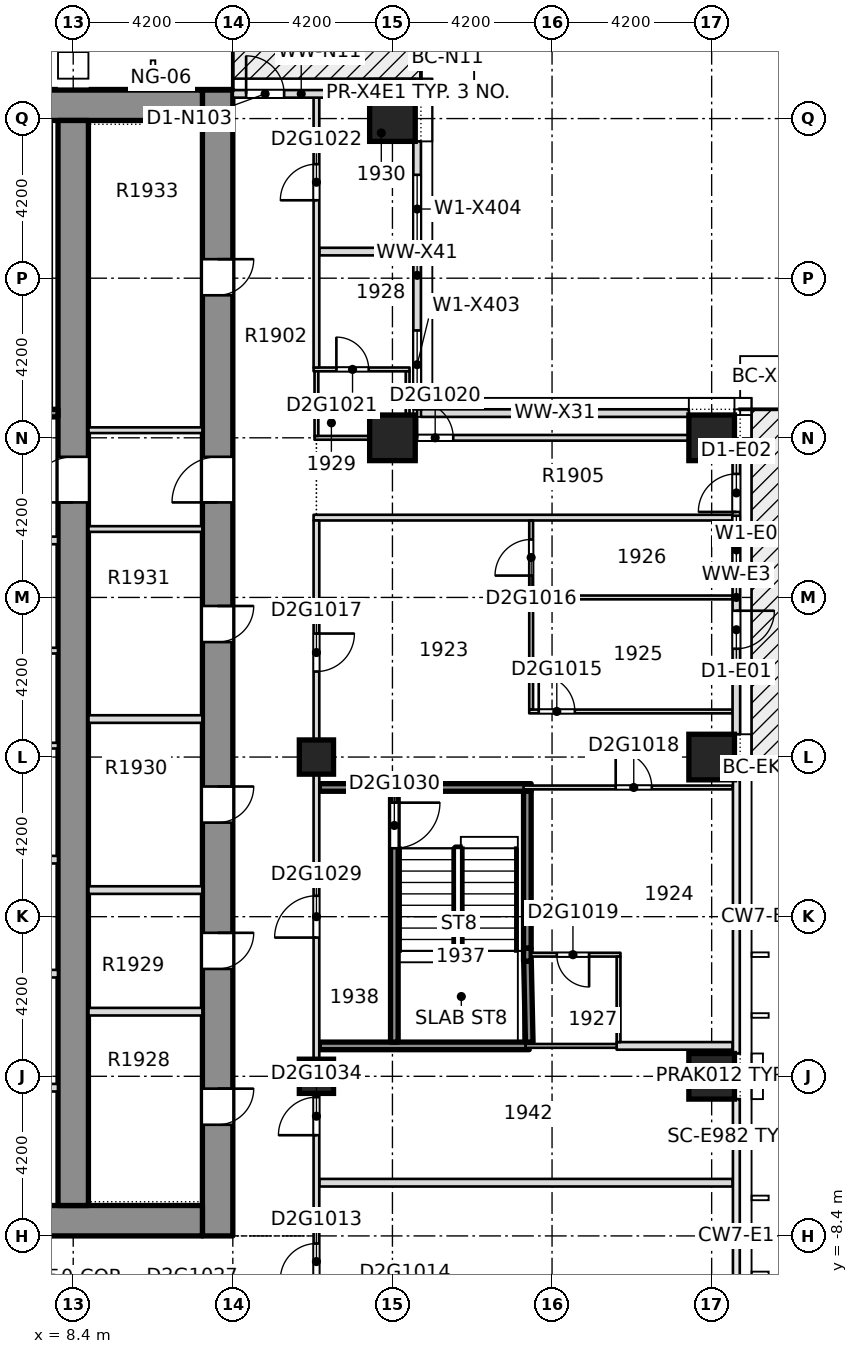
"""IFC4 building model, lengths in metres.
Left out: names, types, materials, properties, quantities, classifications, styles, units other than length and angle.
Written with IfcOpenShell. Run it as: python <this file> out.ifc"""

import sys

from ifc_helpers import new_model, si_unit, direction, frame, frame_2d, origin, origin_2d, place, context, subcontext, project, spatial, rectangle, extrude, element, fill, save


model = new_model("IFC4")
c1 = context("Model", 3, precision=1e-05, world=origin(), true_north=direction((0.0, 1.0)))
c2 = subcontext(c1, "Body", "Model", "MODEL_VIEW")
j1 = project(units=[si_unit("LENGTHUNIT", "METRE"), si_unit("PLANEANGLEUNIT", "RADIAN")], contexts=[c1])
p1 = place(None, origin())
s1 = spatial("IfcSite", under=j1, at=p1, CompositionType="ELEMENT")
p2 = place(p1, origin())
s2 = spatial("IfcBuilding", under=s1, at=p2, CompositionType="ELEMENT")
p3 = place(p2, frame((0.0, 0.0, 75.9)))
s3 = spatial("IfcBuildingStorey", under=s2, at=p3, CompositionType="ELEMENT", Elevation=75.9)
p4 = place(p3, frame((12.15, -8.4, -0.5), z_axis=(0.0, 0.0, 1.0), x_axis=(0.0, 1.0, 0.0)))
e1 = element("IfcWall", 1, at=p4, inside=s3, PredefinedType="SHEAR", context=c2, shape_type="SweptSolid", body=[
    extrude(rectangle(XDim=30.15, YDim=0.9, at=frame_2d((15.075, 0.0))), origin(), (0.0, 0.0, 1.0), 4.68),
])
p5 = place(p4, frame((2.875, 0.0, 0.5)))
e2 = element("IfcOpeningElement", 2, at=p5, cuts=e1, PredefinedType="OPENING", context=c2, shape_type="SweptSolid", body=[
    extrude(rectangle(XDim=0.95, YDim=2.1, at=frame_2d((0.475, 1.05))), frame((0.0, 0.46, 0.0), z_axis=(0.0, -1.0, 0.0), x_axis=(1.0, 0.0, 0.0)), (0.0, 0.0, 1.0), 0.92),
])
p6 = place(p4, frame((6.575, 0.0, 0.5)))
e3 = element("IfcOpeningElement", 3, at=p6, cuts=e1, PredefinedType="OPENING", context=c2, shape_type="SweptSolid", body=[
    extrude(rectangle(XDim=0.95, YDim=2.1, at=frame_2d((0.475, 1.05))), frame((0.0, 0.46, 0.0), z_axis=(0.0, -1.0, 0.0), x_axis=(1.0, 0.0, 0.0)), (0.0, 0.0, 1.0), 0.92),
])
p7 = place(p4, frame((9.425, 0.0, 0.5)))
e4 = element("IfcOpeningElement", 4, at=p7, cuts=e1, PredefinedType="OPENING", context=c2, shape_type="SweptSolid", body=[
    extrude(rectangle(XDim=0.95, YDim=2.1, at=frame_2d((0.475, 1.05))), frame((0.0, 0.46, 0.0), z_axis=(0.0, -1.0, 0.0), x_axis=(1.0, 0.0, 0.0)), (0.0, 0.0, 1.0), 0.92),
])
p8 = place(p4, frame((13.225, 0.0, 0.5)))
e5 = element("IfcOpeningElement", 5, at=p8, cuts=e1, PredefinedType="OPENING", context=c2, shape_type="SweptSolid", body=[
    extrude(rectangle(XDim=0.95, YDim=2.1, at=frame_2d((0.475, 1.05))), frame((0.0, 0.46, 0.0), z_axis=(0.0, -1.0, 0.0), x_axis=(1.0, 0.0, 0.0)), (0.0, 0.0, 1.0), 0.92),
])
p9 = place(p4, frame((16.775, 0.0, 0.5)))
e6 = element("IfcOpeningElement", 6, at=p9, cuts=e1, PredefinedType="OPENING", context=c2, shape_type="SweptSolid", body=[
    extrude(rectangle(XDim=0.95, YDim=2.1, at=frame_2d((0.475, 1.05))), frame((0.0, 0.46, 0.0), z_axis=(0.0, -1.0, 0.0), x_axis=(1.0, 0.0, 0.0)), (0.0, 0.0, 1.0), 0.92),
])
p10 = place(p4, frame((24.75, 0.0, 0.5)))
e7 = element("IfcOpeningElement", 7, at=p10, cuts=e1, PredefinedType="OPENING", context=c2, shape_type="SweptSolid", body=[
    extrude(rectangle(XDim=0.95, YDim=2.1, at=frame_2d((0.475, 1.05))), frame((0.0, 0.46, 0.0), z_axis=(0.0, -1.0, 0.0), x_axis=(1.0, 0.0, 0.0)), (0.0, 0.0, 1.0), 0.92),
])
p11 = place(p4, frame((19.3, 0.0, 0.5)))
e8 = element("IfcOpeningElement", 8, at=p11, cuts=e1, PredefinedType="OPENING", context=c2, shape_type="SweptSolid", body=[
    extrude(rectangle(XDim=1.2, YDim=2.1, at=frame_2d((0.6, 1.05))), frame((0.0, 0.46, 0.0), z_axis=(0.0, -1.0, 0.0), x_axis=(1.0, 0.0, 0.0)), (0.0, 0.0, 1.0), 0.92),
])
p12 = place(p3, frame((-11.7, -7.95, -0.5), z_axis=(0.0, 0.0, 1.0), x_axis=(1.0, 0.0, 0.0)))
e9 = element("IfcWall", 9, at=p12, inside=s3, PredefinedType="SHEAR", context=c2, shape_type="SweptSolid", body=[
    extrude(rectangle(XDim=23.4, YDim=0.9, at=frame_2d((11.7, 0.0))), origin(), (0.0, 0.0, 1.0), 4.68),
])
p13 = place(p12, frame((6.95, 0.0, 0.5)))
e10 = element("IfcOpeningElement", 10, at=p13, cuts=e9, PredefinedType="OPENING", context=c2, shape_type="SweptSolid", body=[
    extrude(rectangle(XDim=1.8, YDim=2.1, at=frame_2d((0.9, 1.05))), frame((0.0, 0.46, 0.0), z_axis=(0.0, -1.0, 0.0), x_axis=(1.0, 0.0, 0.0)), (0.0, 0.0, 1.0), 0.92),
])
p14 = place(p12, frame((14.65, 0.0, 0.5)))
e11 = element("IfcOpeningElement", 11, at=p14, cuts=e9, PredefinedType="OPENING", context=c2, shape_type="SweptSolid", body=[
    extrude(rectangle(XDim=1.8, YDim=2.1, at=frame_2d((0.9, 1.05))), frame((0.0, 0.46, 0.0), z_axis=(0.0, -1.0, 0.0), x_axis=(1.0, 0.0, 0.0)), (0.0, 0.0, 1.0), 0.92),
])
p15 = place(p3, frame((-11.7, 21.3, -0.5), z_axis=(0.0, 0.0, 1.0), x_axis=(1.0, 0.0, 0.0)))
e12 = element("IfcWall", 12, at=p15, inside=s3, PredefinedType="SOLIDWALL", context=c2, shape_type="SweptSolid", body=[
    extrude(rectangle(XDim=23.4, YDim=0.9, at=frame_2d((11.7, 0.0))), origin(), (0.0, 0.0, 1.0), 4.68),
])
p16 = place(p3, frame((8.4, -7.5, -0.5), z_axis=(0.0, 0.0, 1.0), x_axis=(0.0, 1.0, 0.0)))
e13 = element("IfcWall", 13, at=p16, inside=s3, PredefinedType="SHEAR", context=c2, shape_type="SweptSolid", body=[
    extrude(rectangle(XDim=28.35, YDim=0.9, at=frame_2d((14.175, 0.0))), origin(), (0.0, 0.0, 1.0), 4.68),
])
p17 = place(p16, frame((18.4, 0.0, 0.5)))
e14 = element("IfcOpeningElement", 14, at=p17, cuts=e13, PredefinedType="OPENING", context=c2, shape_type="SweptSolid", body=[
    extrude(rectangle(XDim=1.2, YDim=2.1, at=frame_2d((0.6, 1.05))), frame((0.0, 0.46, 0.0), z_axis=(0.0, -1.0, 0.0), x_axis=(1.0, 0.0, 0.0)), (0.0, 0.0, 1.0), 0.92),
])
p18 = place(p3, frame((16.8, 21.0, -0.5), z_axis=(0.0, 0.0, 1.0), x_axis=(1.0, 0.0, 0.0)))
e15 = element("IfcColumn", 15, at=p18, inside=s3, PredefinedType="COLUMN", context=c2, shape_type="SweptSolid", body=[
    extrude(rectangle(XDim=1.4, YDim=1.4, at=origin_2d()), origin(), (0.0, 0.0, 1.0), 4.68),
])
for number, where, z_axis, x_axis in (
    (16, (14.9, -4.2, 0.0), (0.0, 0.0, 1.0), (1.0, 0.0, 0.0)),
    (17, (14.9, 4.2, 0.0), (0.0, 0.0, 1.0), (1.0, 0.0, 0.0)),
    (18, (14.9, 12.6, 0.0), (0.0, 0.0, 1.0), (1.0, 0.0, 0.0)),
):
    element("IfcWall", number, at=place(p3, frame(where, z_axis=z_axis, x_axis=x_axis)), inside=s3, PredefinedType="SHEAR", context=c2, shape_type="SweptSolid", body=[
        extrude(rectangle(XDim=10.3, YDim=0.6, at=frame_2d((5.15, 0.0))), origin(), (0.0, 0.0, 1.0), 4.18),
    ])
p19 = place(p3, frame((14.725, -8.4, 0.0), z_axis=(0.0, 0.0, 1.0), x_axis=(1.0, 0.0, 0.0)))
e19 = element("IfcWall", 19, at=p19, inside=s3, PredefinedType="PARTITIONING", context=c2, shape_type="SweptSolid", body=[
    extrude(rectangle(XDim=7.4, YDim=0.15, at=frame_2d((3.7, 0.0))), origin(), (0.0, 0.0, 1.0), 4.18),
])
p20 = place(p19, frame((0.775, 0.0, 0.0)))
e20 = element("IfcOpeningElement", 20, at=p20, cuts=e19, PredefinedType="OPENING", context=c2, shape_type="SweptSolid", body=[
    extrude(rectangle(XDim=1.2, YDim=2.1, at=frame_2d((0.6, 1.05))), frame((0.0, 0.085, 0.0), z_axis=(0.0, -1.0, 0.0), x_axis=(1.0, 0.0, 0.0)), (0.0, 0.0, 1.0), 0.17),
])
for number, where, z_axis, x_axis in (
    (21, (25.201, -4.35, 0.0), (0.0, 0.0, 1.0), (1.0, 0.0, 0.0)),
    (22, (25.201, 4.091, 0.0), (0.0, 0.0, 1.0), (1.0, 0.0, 0.0)),
):
    element("IfcWall", number, at=place(p3, frame(where, z_axis=z_axis, x_axis=x_axis)), inside=s3, PredefinedType="PARTITIONING", context=c2, shape_type="SweptSolid", body=[
        extrude(rectangle(XDim=0.549, YDim=0.2, at=frame_2d((0.274, 0.0))), origin(), (0.0, 0.0, 1.0), 4.18),
    ])
p21 = place(p3, frame((14.875, 10.95, 0.0), z_axis=(0.0, 0.0, 1.0), x_axis=(1.0, 0.0, 0.0)))
e23 = element("IfcWall", 23, at=p21, inside=s3, PredefinedType="PARTITIONING", context=c2, shape_type="SweptSolid", body=[
    extrude(rectangle(XDim=10.875, YDim=0.2, at=frame_2d((5.438, 0.0))), origin(), (0.0, 0.0, 1.0), 4.18),
])
p22 = place(p3, frame((14.875, 13.35, 0.0), z_axis=(0.0, 0.0, 1.0), x_axis=(1.0, 0.0, 0.0)))
e24 = element("IfcWall", 24, at=p22, inside=s3, PredefinedType="PARTITIONING", context=c2, shape_type="SweptSolid", body=[
    extrude(rectangle(XDim=2.475, YDim=0.2, at=frame_2d((1.238, 0.0))), origin(), (0.0, 0.0, 1.0), 4.18),
])
p23 = place(p3, frame((14.8, -8.325, 0.0), z_axis=(0.0, 0.0, 1.0), x_axis=(0.0, 1.0, 0.0)))
e25 = element("IfcWall", 25, at=p23, inside=s3, PredefinedType="PARTITIONING", context=c2, shape_type="SweptSolid", body=[
    extrude(rectangle(XDim=29.875, YDim=0.15, at=frame_2d((14.938, 0.0))), origin(), (0.0, 0.0, 1.0), 4.18),
])
p24 = place(p23, frame((7.595, 0.0, 0.0)))
e26 = element("IfcOpeningElement", 26, at=p24, cuts=e25, PredefinedType="OPENING", context=c2, shape_type="SweptSolid", body=[
    extrude(rectangle(XDim=1.2, YDim=2.1, at=frame_2d((0.6, 1.05))), frame((0.0, 0.085, 0.0), z_axis=(0.0, -1.0, 0.0), x_axis=(1.0, 0.0, 0.0)), (0.0, 0.0, 1.0), 0.17),
])
p25 = place(p23, frame((15.245, 0.0, 0.0)))
e27 = element("IfcOpeningElement", 27, at=p25, cuts=e25, PredefinedType="OPENING", context=c2, shape_type="SweptSolid", body=[
    extrude(rectangle(XDim=1.2, YDim=2.1, at=frame_2d((0.6, 1.05))), frame((0.0, 0.085, 0.0), z_axis=(0.0, -1.0, 0.0), x_axis=(1.0, 0.0, 0.0)), (0.0, 0.0, 1.0), 0.17),
])
p26 = place(p23, frame((19.375, 0.0, 0.0)))
e28 = element("IfcOpeningElement", 28, at=p26, cuts=e25, PredefinedType="OPENING", context=c2, shape_type="SweptSolid", body=[
    extrude(rectangle(XDim=1.2, YDim=2.1, at=frame_2d((0.6, 1.05))), frame((0.0, 0.085, 0.0), z_axis=(0.0, -1.0, 0.0), x_axis=(1.0, 0.0, 0.0)), (0.0, 0.0, 1.0), 0.17),
])
p27 = place(p23, frame((25.325, 0.0, 0.0)))
e29 = element("IfcOpeningElement", 29, at=p27, cuts=e25, PredefinedType="OPENING", context=c2, shape_type="SweptSolid", body=[
    extrude(rectangle(XDim=0.9, YDim=2.1, at=frame_2d((0.45, 1.05))), frame((0.0, 0.085, 0.0), z_axis=(0.0, -1.0, 0.0), x_axis=(1.0, 0.0, 0.0)), (0.0, 0.0, 1.0), 0.17),
])
p28 = place(p3, frame((22.05, -12.299, 0.0), z_axis=(0.0, 0.0, 1.0), x_axis=(0.0, 1.0, 0.0)))
e30 = element("IfcWall", 30, at=p28, inside=s3, PredefinedType="PARTITIONING", context=c2, shape_type="SweptSolid", body=[
    extrude(rectangle(XDim=3.824, YDim=0.15, at=frame_2d((1.912, 0.0))), origin(), (0.0, 0.0, 1.0), 4.18),
])
for number, where, z_axis, x_axis in (
    (31, (25.85, -11.9, 0.0), (0.0, 0.0, 1.0), (0.0, 1.0, 0.0)),
    (32, (25.85, -3.5, 0.0), (0.0, 0.0, 1.0), (0.0, 1.0, 0.0)),
    (33, (25.85, 4.9, 0.0), (0.0, 0.0, 1.0), (0.0, 1.0, 0.0)),
):
    element("IfcWall", number, at=place(p3, frame(where, z_axis=z_axis, x_axis=x_axis)), inside=s3, PredefinedType="STANDARD", context=c2, shape_type="SweptSolid", body=[
        extrude(rectangle(XDim=7.0, YDim=0.2, at=frame_2d((3.5, 0.0))), origin(), (0.0, 0.0, 1.0), 4.18),
    ])
for number, where, z_axis, x_axis in (
    (34, (24.5, 13.25, 0.0), (0.0, 0.0, 1.0), (-1.0, 0.0, 0.0)),
    (35, (17.45, 13.35, 0.0), (0.0, 0.0, 1.0), (0.0, 1.0, 0.0)),
):
    element("IfcWall", number, at=place(p3, frame(where, z_axis=z_axis, x_axis=x_axis)), inside=s3, PredefinedType="STANDARD", context=c2, shape_type="SweptSolid", body=[
        extrude(rectangle(XDim=6.95, YDim=0.2, at=frame_2d((3.475, 0.0))), origin(), (0.0, 0.0, 1.0), 4.18),
    ])
p29 = place(p3, frame((16.1, 21.65, 0.0), z_axis=(0.0, 0.0, 1.0), x_axis=(-1.0, 0.0, 0.0)))
e36 = element("IfcWall", 36, at=p29, inside=s3, PredefinedType="STANDARD", context=c2, shape_type="SweptSolid", body=[
    extrude(rectangle(XDim=3.5, YDim=0.2, at=frame_2d((1.75, 0.0))), origin(), (0.0, 0.0, 1.0), 4.18),
])
for number, where, z_axis, x_axis in (
    (37, (5.575, -4.5, 0.0), (0.0, 0.0, 1.0), (1.0, 0.0, 0.0)),
    (38, (5.575, -1.5, 0.0), (0.0, 0.0, 1.0), (1.0, 0.0, 0.0)),
):
    element("IfcWall", number, at=place(p3, frame(where, z_axis=z_axis, x_axis=x_axis)), inside=s3, PredefinedType="PARTITIONING", context=c2, shape_type="SweptSolid", body=[
        extrude(rectangle(XDim=2.374, YDim=0.2, at=frame_2d((1.187, 0.0))), origin(), (0.0, 0.0, 1.0), 4.18),
    ])
p30 = place(p3, frame((5.425, 4.5, 0.0), z_axis=(0.0, 0.0, 1.0), x_axis=(1.0, 0.0, 0.0)))
e39 = element("IfcWall", 39, at=p30, inside=s3, PredefinedType="PARTITIONING", context=c2, shape_type="SweptSolid", body=[
    extrude(rectangle(XDim=2.524, YDim=0.15, at=frame_2d((1.262, 0.0))), origin(), (0.0, 0.0, 1.0), 4.18),
])
p31 = place(p3, frame((-7.949, 7.0, 0.0), z_axis=(0.0, 0.0, 1.0), x_axis=(1.0, 0.0, 0.0)))
e40 = element("IfcWall", 40, at=p31, inside=s3, PredefinedType="PARTITIONING", context=c2, shape_type="SweptSolid", body=[
    extrude(rectangle(XDim=15.898, YDim=0.15, at=frame_2d((7.949, 0.0))), origin(), (0.0, 0.0, 1.0), 4.18),
])
p32 = place(p31, frame((7.249, 0.0, 0.0)))
e41 = element("IfcOpeningElement", 41, at=p32, cuts=e40, PredefinedType="OPENING", context=c2, shape_type="SweptSolid", body=[
    extrude(rectangle(XDim=1.4, YDim=2.1, at=frame_2d((0.7, 1.05))), frame((0.0, 0.085, 0.0), z_axis=(0.0, -1.0, 0.0), x_axis=(1.0, 0.0, 0.0)), (0.0, 0.0, 1.0), 0.17),
])
p33 = place(p3, frame((3.6, 9.9, 0.0), z_axis=(0.0, 0.0, 1.0), x_axis=(1.0, 0.0, 0.0)))
e42 = element("IfcWall", 42, at=p33, inside=s3, PredefinedType="PARTITIONING", context=c2, shape_type="SweptSolid", body=[
    extrude(rectangle(XDim=4.349, YDim=0.2, at=frame_2d((2.174, 0.0))), origin(), (0.0, 0.0, 1.0), 4.18),
])
p34 = place(p33, frame((2.25, 0.0, 0.0)))
e43 = element("IfcOpeningElement", 43, at=p34, cuts=e42, PredefinedType="OPENING", context=c2, shape_type="SweptSolid", body=[
    extrude(rectangle(XDim=1.1, YDim=2.1, at=frame_2d((0.55, 1.05))), frame((0.0, 0.11, 0.0), z_axis=(0.0, -1.0, 0.0), x_axis=(1.0, 0.0, 0.0)), (0.0, 0.0, 1.0), 0.22),
])
p35 = place(p3, frame((3.425, 13.25, 0.0), z_axis=(0.0, 0.0, 1.0), x_axis=(1.0, 0.0, 0.0)))
e44 = element("IfcWall", 44, at=p35, inside=s3, PredefinedType="SOLIDWALL", context=c2, shape_type="SweptSolid", body=[
    extrude(rectangle(XDim=4.524, YDim=0.2, at=frame_2d((2.262, 0.0))), origin(), (0.0, 0.0, 1.0), 4.18),
])
p36 = place(p35, frame((1.825, 0.0, 0.0)))
e45 = element("IfcOpeningElement", 45, at=p36, cuts=e44, PredefinedType="OPENING", context=c2, shape_type="SweptSolid", body=[
    extrude(rectangle(XDim=1.2, YDim=2.1, at=frame_2d((0.6, 1.05))), frame((0.0, 0.11, 0.0), z_axis=(0.0, -1.0, 0.0), x_axis=(1.0, 0.0, 0.0)), (0.0, 0.0, 1.0), 0.22),
])
for number, where, z_axis, x_axis in (
    (46, (8.851, -2.6, 0.0), (0.0, 0.0, 1.0), (1.0, 0.0, 0.0)),
    (47, (8.851, -0.1, 0.0), (0.0, 0.0, 1.0), (1.0, 0.0, 0.0)),
    (48, (8.851, 3.1, 0.0), (0.0, 0.0, 1.0), (1.0, 0.0, 0.0)),
):
    element("IfcWall", number, at=place(p3, frame(where, z_axis=z_axis, x_axis=x_axis)), inside=s3, PredefinedType="PARTITIONING", context=c2, shape_type="SweptSolid", body=[
        extrude(rectangle(XDim=2.848, YDim=0.2, at=frame_2d((1.424, 0.0))), origin(), (0.0, 0.0, 1.0), 4.18),
    ])
for number, where, z_axis, x_axis in (
    (49, (8.851, 7.5, 0.0), (0.0, 0.0, 1.0), (1.0, 0.0, 0.0)),
    (50, (8.851, 10.2, 0.0), (0.0, 0.0, 1.0), (1.0, 0.0, 0.0)),
):
    element("IfcWall", number, at=place(p3, frame(where, z_axis=z_axis, x_axis=x_axis)), inside=s3, PredefinedType="PARTITIONING", context=c2, shape_type="SweptSolid", body=[
        extrude(rectangle(XDim=2.848, YDim=0.1, at=frame_2d((1.424, 0.0))), origin(), (0.0, 0.0, 1.0), 4.18),
    ])
p37 = place(p3, frame((8.851, 12.8, 0.0), z_axis=(0.0, 0.0, 1.0), x_axis=(1.0, 0.0, 0.0)))
e51 = element("IfcWall", 51, at=p37, inside=s3, PredefinedType="PARTITIONING", context=c2, shape_type="SweptSolid", body=[
    extrude(rectangle(XDim=2.848, YDim=0.15, at=frame_2d((1.424, 0.0))), origin(), (0.0, 0.0, 1.0), 4.18),
])
for number, where, z_axis, x_axis in (
    (52, (16.75, -3.4, 0.0), (0.0, 0.0, 1.0), (1.0, 0.0, 0.0)),
    (53, (16.75, 3.4, 0.0), (0.0, 0.0, 1.0), (1.0, 0.0, 0.0)),
):
    element("IfcWall", number, at=place(p3, frame(where, z_axis=z_axis, x_axis=x_axis)), inside=s3, PredefinedType="SOLIDWALL", context=c2, shape_type="SweptSolid", body=[
        extrude(rectangle(XDim=3.7, YDim=0.2, at=frame_2d((1.85, 0.0))), origin(), (0.0, 0.0, 1.0), 4.18),
    ])
for number, where, z_axis, x_axis in (
    (54, (16.85, -3.3, 0.0), (0.0, 0.0, 1.0), (0.0, 1.0, 0.0)),
    (55, (20.35, -3.3, 0.0), (0.0, 0.0, 1.0), (0.0, 1.0, 0.0)),
):
    element("IfcWall", number, at=place(p3, frame(where, z_axis=z_axis, x_axis=x_axis)), inside=s3, PredefinedType="SOLIDWALL", context=c2, shape_type="SweptSolid", body=[
        extrude(rectangle(XDim=6.6, YDim=0.2, at=frame_2d((3.3, 0.0))), origin(), (0.0, 0.0, 1.0), 4.18),
    ])
p38 = place(p20, origin())
e56 = element("IfcDoor", 56, at=p38, inside=s3, OperationType="SINGLE_SWING_RIGHT", PredefinedType="DOOR", context=c2, shape_type="SweptSolid", body=[
    extrude(rectangle(XDim=1.2, YDim=2.1, at=frame_2d((0.6, 1.05))), frame((0.0, 0.025, 0.0), z_axis=(0.0, -1.0, 0.0), x_axis=(1.0, 0.0, 0.0)), (0.0, 0.0, 1.0), 0.05),
])
fill(e20, e56)
p39 = place(p24, origin())
e57 = element("IfcDoor", 57, at=p39, inside=s3, OperationType="SINGLE_SWING_LEFT", PredefinedType="DOOR", context=c2, shape_type="SweptSolid", body=[
    extrude(rectangle(XDim=1.2, YDim=2.1, at=frame_2d((0.6, 1.05))), frame((0.0, 0.025, 0.0), z_axis=(0.0, -1.0, 0.0), x_axis=(1.0, 0.0, 0.0)), (0.0, 0.0, 1.0), 0.05),
])
fill(e26, e57)
p40 = place(p25, origin())
e58 = element("IfcDoor", 58, at=p40, inside=s3, OperationType="SINGLE_SWING_LEFT", PredefinedType="DOOR", context=c2, shape_type="SweptSolid", body=[
    extrude(rectangle(XDim=1.2, YDim=2.1, at=frame_2d((0.6, 1.05))), frame((0.0, 0.025, 0.0), z_axis=(0.0, -1.0, 0.0), x_axis=(1.0, 0.0, 0.0)), (0.0, 0.0, 1.0), 0.05),
])
fill(e27, e58)
p41 = place(p26, origin())
e59 = element("IfcDoor", 59, at=p41, inside=s3, OperationType="SINGLE_SWING_RIGHT", PredefinedType="DOOR", context=c2, shape_type="SweptSolid", body=[
    extrude(rectangle(XDim=1.2, YDim=2.1, at=frame_2d((0.6, 1.05))), frame((0.0, 0.025, 0.0), z_axis=(0.0, -1.0, 0.0), x_axis=(1.0, 0.0, 0.0)), (0.0, 0.0, 1.0), 0.05),
])
fill(e28, e59)
p42 = place(p27, origin())
e60 = element("IfcDoor", 60, at=p42, inside=s3, OperationType="SINGLE_SWING_RIGHT", PredefinedType="DOOR", context=c2, shape_type="SweptSolid", body=[
    extrude(rectangle(XDim=0.9, YDim=2.1, at=frame_2d((0.45, 1.05))), frame((0.0, 0.025, 0.0), z_axis=(0.0, -1.0, 0.0), x_axis=(1.0, 0.0, 0.0)), (0.0, 0.0, 1.0), 0.05),
])
fill(e29, e60)
p43 = place(p5, origin())
e61 = element("IfcDoor", 61, at=p43, inside=s3, OperationType="SINGLE_SWING_LEFT", PredefinedType="DOOR", context=c2, shape_type="SweptSolid", body=[
    extrude(rectangle(XDim=0.95, YDim=2.1, at=frame_2d((0.475, 1.05))), frame((0.0, 0.025, 0.0), z_axis=(0.0, -1.0, 0.0), x_axis=(1.0, 0.0, 0.0)), (0.0, 0.0, 1.0), 0.05),
])
fill(e2, e61)
p44 = place(p6, origin())
e62 = element("IfcDoor", 62, at=p44, inside=s3, OperationType="SINGLE_SWING_LEFT", PredefinedType="DOOR", context=c2, shape_type="SweptSolid", body=[
    extrude(rectangle(XDim=0.95, YDim=2.1, at=frame_2d((0.475, 1.05))), frame((0.0, 0.025, 0.0), z_axis=(0.0, -1.0, 0.0), x_axis=(1.0, 0.0, 0.0)), (0.0, 0.0, 1.0), 0.05),
])
fill(e3, e62)
p45 = place(p7, origin())
e63 = element("IfcDoor", 63, at=p45, inside=s3, OperationType="SINGLE_SWING_LEFT", PredefinedType="DOOR", context=c2, shape_type="SweptSolid", body=[
    extrude(rectangle(XDim=0.95, YDim=2.1, at=frame_2d((0.475, 1.05))), frame((0.0, 0.025, 0.0), z_axis=(0.0, -1.0, 0.0), x_axis=(1.0, 0.0, 0.0)), (0.0, 0.0, 1.0), 0.05),
])
fill(e4, e63)
p46 = place(p8, origin())
e64 = element("IfcDoor", 64, at=p46, inside=s3, OperationType="SINGLE_SWING_LEFT", PredefinedType="DOOR", context=c2, shape_type="SweptSolid", body=[
    extrude(rectangle(XDim=0.95, YDim=2.1, at=frame_2d((0.475, 1.05))), frame((0.0, 0.025, 0.0), z_axis=(0.0, -1.0, 0.0), x_axis=(1.0, 0.0, 0.0)), (0.0, 0.0, 1.0), 0.05),
])
fill(e5, e64)
p47 = place(p9, origin())
e65 = element("IfcDoor", 65, at=p47, inside=s3, OperationType="SINGLE_SWING_LEFT", PredefinedType="DOOR", context=c2, shape_type="SweptSolid", body=[
    extrude(rectangle(XDim=0.95, YDim=2.1, at=frame_2d((0.475, 1.05))), frame((0.0, 0.025, 0.0), z_axis=(0.0, -1.0, 0.0), x_axis=(1.0, 0.0, 0.0)), (0.0, 0.0, 1.0), 0.05),
])
fill(e6, e65)
p48 = place(p10, origin())
e66 = element("IfcDoor", 66, at=p48, inside=s3, OperationType="SINGLE_SWING_LEFT", PredefinedType="DOOR", context=c2, shape_type="SweptSolid", body=[
    extrude(rectangle(XDim=0.95, YDim=2.1, at=frame_2d((0.475, 1.05))), frame((0.0, 0.025, 0.0), z_axis=(0.0, -1.0, 0.0), x_axis=(1.0, 0.0, 0.0)), (0.0, 0.0, 1.0), 0.05),
])
fill(e7, e66)
p49 = place(p11, origin())
e67 = element("IfcDoor", 67, at=p49, inside=s3, OperationType="SINGLE_SWING_LEFT", PredefinedType="DOOR", context=c2, shape_type="SweptSolid", body=[
    extrude(rectangle(XDim=1.2, YDim=2.1, at=frame_2d((0.6, 1.05))), frame((0.0, 0.025, 0.0), z_axis=(0.0, -1.0, 0.0), x_axis=(1.0, 0.0, 0.0)), (0.0, 0.0, 1.0), 0.05),
])
fill(e8, e67)
p50 = place(p17, origin())
e68 = element("IfcDoor", 68, at=p50, inside=s3, OperationType="SINGLE_SWING_LEFT", PredefinedType="DOOR", context=c2, shape_type="SweptSolid", body=[
    extrude(rectangle(XDim=1.2, YDim=2.1, at=frame_2d((0.6, 1.05))), frame((0.0, 0.025, 0.0), z_axis=(0.0, -1.0, 0.0), x_axis=(1.0, 0.0, 0.0)), (0.0, 0.0, 1.0), 0.05),
])
fill(e14, e68)
save(model, sys.argv[1])
